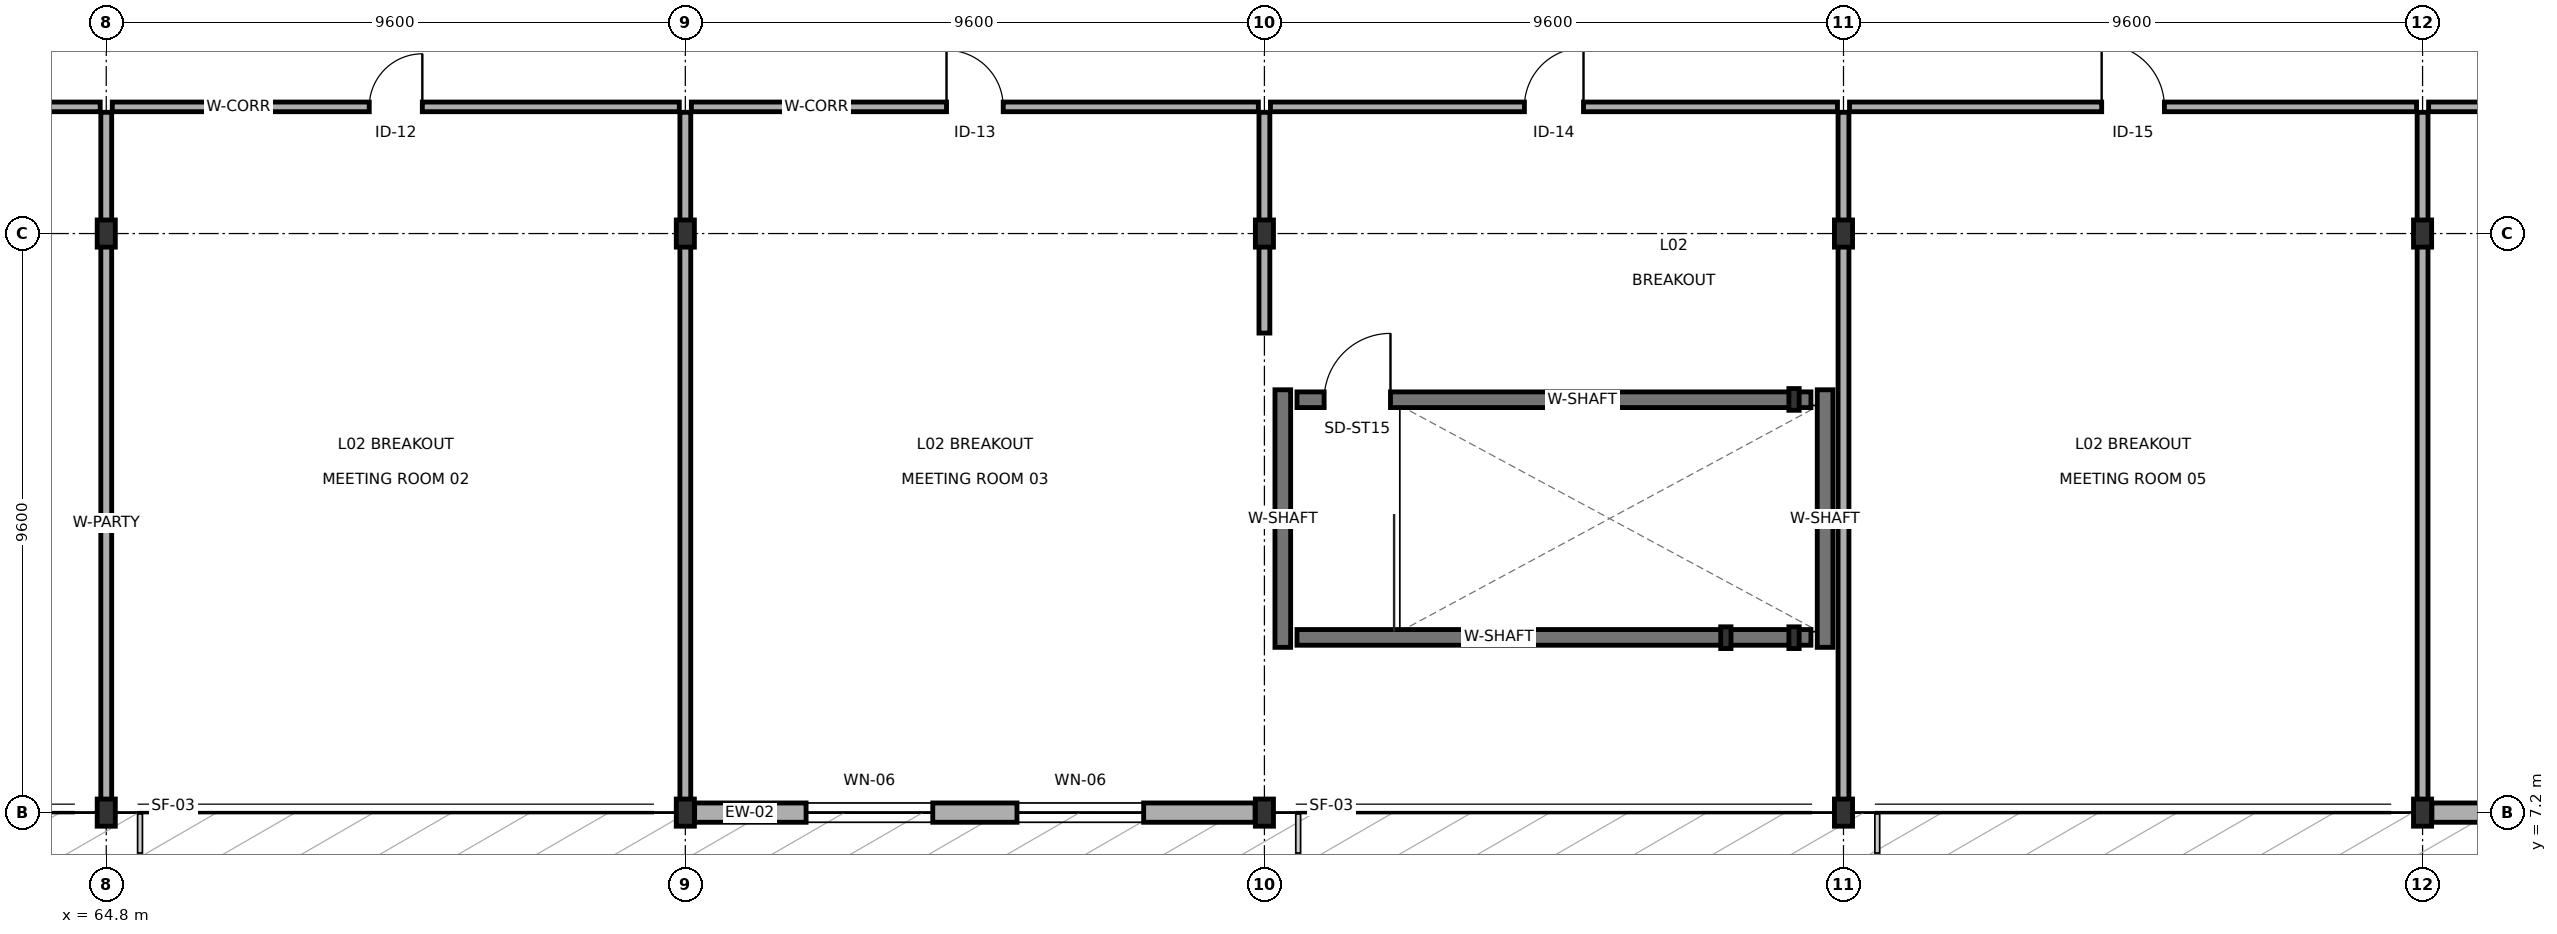
"""IFC4 building model, lengths in metres.
Left out: names, types, materials, properties, quantities, classifications, styles, units other than length and angle.
Written with IfcOpenShell. Run it as: python <this file> out.ifc"""

import sys

from ifc_helpers import new_model, si_unit, direction, frame, frame_2d, origin, origin_2d, place, context, subcontext, project, spatial, rectangle, i_section, extrude, element, fill, save


model = new_model("IFC4")
c1 = context("Model", 3, precision=1e-05, world=origin(), true_north=direction((0.0, 1.0)))
c2 = subcontext(c1, "Body", "Model", "MODEL_VIEW")
j1 = project(units=[si_unit("LENGTHUNIT", "METRE"), si_unit("PLANEANGLEUNIT", "RADIAN")], contexts=[c1])
p1 = place(None, origin())
s1 = spatial("IfcSite", under=j1, at=p1, CompositionType="ELEMENT")
p2 = place(p1, origin())
s2 = spatial("IfcBuilding", under=s1, at=p2, CompositionType="ELEMENT")
p3 = place(p2, frame((0.0, 0.0, 5.4)))
s3 = spatial("IfcBuildingStorey", under=s2, at=p3, CompositionType="ELEMENT", Elevation=5.4)
for number, where, z_axis, x_axis in (
    (1, (64.8, 7.2, 0.0), (0.0, 0.0, 1.0), (1.0, 0.0, 0.0)),
    (2, (64.8, 16.8, 0.0), (0.0, 0.0, 1.0), (1.0, 0.0, 0.0)),
    (3, (74.4, 7.2, 0.0), (0.0, 0.0, 1.0), (1.0, 0.0, 0.0)),
    (4, (74.4, 16.8, 0.0), (0.0, 0.0, 1.0), (1.0, 0.0, 0.0)),
    (5, (84.0, 7.2, 0.0), (0.0, 0.0, 1.0), (1.0, 0.0, 0.0)),
    (6, (84.0, 16.8, 0.0), (0.0, 0.0, 1.0), (1.0, 0.0, 0.0)),
    (7, (93.6, 7.2, 0.0), (0.0, 0.0, 1.0), (1.0, 0.0, 0.0)),
    (8, (93.6, 16.8, 0.0), (0.0, 0.0, 1.0), (1.0, 0.0, 0.0)),
    (9, (103.2, 7.2, 0.0), (0.0, 0.0, 1.0), (1.0, 0.0, 0.0)),
    (10, (103.2, 16.8, 0.0), (0.0, 0.0, 1.0), (1.0, 0.0, 0.0)),
):
    element("IfcColumn", number, at=place(p3, frame(where, z_axis=z_axis, x_axis=x_axis)), inside=s3, PredefinedType="COLUMN", context=c2, shape_type="SweptSolid", body=[
        extrude(i_section(OverallWidth=0.3, OverallDepth=0.45, WebThickness=0.014, FlangeThickness=0.026, FilletRadius=0.027, at=origin_2d()), origin(), (0.0, 0.0, 1.0), 4.5),
    ])
for number, where, z_axis, x_axis in (
    (11, (91.65, 10.1, 0.0), (0.0, 0.0, 1.0), (1.0, 0.0, 0.0)),
    (12, (92.78, 10.1, 0.0), (0.0, 0.0, 1.0), (1.0, 0.0, 0.0)),
    (13, (92.78, 14.05, 0.0), (0.0, 0.0, 1.0), (1.0, 0.0, 0.0)),
):
    element("IfcColumn", number, at=place(p3, frame(where, z_axis=z_axis, x_axis=x_axis)), inside=s3, PredefinedType="PILASTER", context=c2, shape_type="SweptSolid", body=[
        extrude(i_section(OverallWidth=0.17, OverallDepth=0.36, WebThickness=0.008, FlangeThickness=0.013, FilletRadius=0.018, at=origin_2d()), origin(), (0.0, 0.0, 1.0), 4.5),
    ])
p4 = place(p3, frame((74.554, 7.2, 0.0), z_axis=(0.0, 0.0, 1.0), x_axis=(1.0, 0.0, 0.0)))
e14 = element("IfcWall", 14, at=p4, inside=s3, PredefinedType="SOLIDWALL", context=c2, shape_type="SweptSolid", body=[
    extrude(rectangle(XDim=9.292, YDim=0.32, at=frame_2d((4.646, 0.0))), origin(), (0.0, 0.0, 1.0), 3.685),
])
p5 = place(p4, frame((1.848, 0.0, 0.75)))
e15 = element("IfcOpeningElement", 15, at=p5, cuts=e14, PredefinedType="OPENING", context=c2, shape_type="SweptSolid", body=[
    extrude(rectangle(XDim=2.1, YDim=1.4, at=frame_2d((1.05, 0.7))), frame((0.0, 0.17, 0.0), z_axis=(0.0, -1.0, 0.0), x_axis=(1.0, 0.0, 0.0)), (0.0, 0.0, 1.0), 0.34),
])
p6 = place(p4, frame((5.344, 0.0, 0.75)))
e16 = element("IfcOpeningElement", 16, at=p6, cuts=e14, PredefinedType="OPENING", context=c2, shape_type="SweptSolid", body=[
    extrude(rectangle(XDim=2.1, YDim=1.4, at=frame_2d((1.05, 0.7))), frame((0.0, 0.17, 0.0), z_axis=(0.0, -1.0, 0.0), x_axis=(1.0, 0.0, 0.0)), (0.0, 0.0, 1.0), 0.34),
])
p7 = place(p3, frame((103.354, 7.2, 0.0), z_axis=(0.0, 0.0, 1.0), x_axis=(1.0, 0.0, 0.0)))
e17 = element("IfcWall", 17, at=p7, inside=s3, PredefinedType="SOLIDWALL", context=c2, shape_type="SweptSolid", body=[
    extrude(rectangle(XDim=4.492, YDim=0.32, at=frame_2d((2.246, 0.0))), origin(), (0.0, 0.0, 1.0), 3.675),
])
for number, where, z_axis, x_axis in (
    (18, (84.305, 9.94, 0.0), (0.0, 0.0, 1.0), (0.0, 1.0, 0.0)),
    (19, (93.295, 9.94, 0.0), (0.0, 0.0, 1.0), (0.0, 1.0, 0.0)),
):
    element("IfcWall", number, at=place(p3, frame(where, z_axis=z_axis, x_axis=x_axis)), inside=s3, PredefinedType="SHEAR", context=c2, shape_type="SweptSolid", body=[
        extrude(rectangle(XDim=4.27, YDim=0.26, at=frame_2d((2.135, 0.0))), origin(), (0.0, 0.0, 1.0), 4.24),
    ])
p8 = place(p3, frame((84.54, 10.105, 0.0), z_axis=(0.0, 0.0, 1.0), x_axis=(1.0, 0.0, 0.0)))
e20 = element("IfcWall", 20, at=p8, inside=s3, PredefinedType="SHEAR", context=c2, shape_type="SweptSolid", body=[
    extrude(rectangle(XDim=8.52, YDim=0.26, at=frame_2d((4.26, 0.0))), origin(), (0.0, 0.0, 1.0), 4.24),
])
p9 = place(p3, frame((84.54, 14.045, 0.0), z_axis=(0.0, 0.0, 1.0), x_axis=(1.0, 0.0, 0.0)))
e21 = element("IfcWall", 21, at=p9, inside=s3, PredefinedType="SHEAR", context=c2, shape_type="SweptSolid", body=[
    extrude(rectangle(XDim=8.52, YDim=0.26, at=frame_2d((4.26, 0.0))), origin(), (0.0, 0.0, 1.0), 4.24),
])
p10 = place(p9, frame((0.45, 0.0, 0.0)))
e22 = element("IfcOpeningElement", 22, at=p10, cuts=e21, PredefinedType="OPENING", context=c2, shape_type="SweptSolid", body=[
    extrude(rectangle(XDim=1.1, YDim=2.2, at=frame_2d((0.55, 1.1))), frame((0.0, 0.14, 0.0), z_axis=(0.0, -1.0, 0.0), x_axis=(1.0, 0.0, 0.0)), (0.0, 0.0, 1.0), 0.28),
])
p11 = place(p3, frame((55.3, 18.9, 0.0), z_axis=(0.0, 0.0, 1.0), x_axis=(1.0, 0.0, 0.0)))
e23 = element("IfcWall", 23, at=p11, inside=s3, PredefinedType="PARTITIONING", context=c2, shape_type="SweptSolid", body=[
    extrude(rectangle(XDim=9.4, YDim=0.16, at=frame_2d((4.7, 0.0))), origin(), (0.0, 0.0, 1.0), 3.675),
])
p12 = place(p11, frame((4.29, 0.0, 0.0)))
e24 = element("IfcOpeningElement", 24, at=p12, cuts=e23, PredefinedType="OPENING", context=c2, shape_type="SweptSolid", body=[
    extrude(rectangle(XDim=0.82, YDim=2.08, at=frame_2d((0.41, 1.04))), frame((0.0, 0.09, 0.0), z_axis=(0.0, -1.0, 0.0), x_axis=(1.0, 0.0, 0.0)), (0.0, 0.0, 1.0), 0.18),
])
p13 = place(p3, frame((64.9, 18.9, 0.0), z_axis=(0.0, 0.0, 1.0), x_axis=(1.0, 0.0, 0.0)))
e25 = element("IfcWall", 25, at=p13, inside=s3, PredefinedType="PARTITIONING", context=c2, shape_type="SweptSolid", body=[
    extrude(rectangle(XDim=9.4, YDim=0.16, at=frame_2d((4.7, 0.0))), origin(), (0.0, 0.0, 1.0), 3.675),
])
p14 = place(p13, frame((4.26, 0.0, 0.0)))
e26 = element("IfcOpeningElement", 26, at=p14, cuts=e25, PredefinedType="OPENING", context=c2, shape_type="SweptSolid", body=[
    extrude(rectangle(XDim=0.88, YDim=2.12, at=frame_2d((0.44, 1.06))), frame((0.0, 0.09, 0.0), z_axis=(0.0, -1.0, 0.0), x_axis=(1.0, 0.0, 0.0)), (0.0, 0.0, 1.0), 0.18),
])
p15 = place(p3, frame((64.8, 7.4, 0.0), z_axis=(0.0, 0.0, 1.0), x_axis=(0.0, 1.0, 0.0)))
e27 = element("IfcWall", 27, at=p15, inside=s3, PredefinedType="PARTITIONING", context=c2, shape_type="SweptSolid", body=[
    extrude(rectangle(XDim=11.41, YDim=0.18, at=frame_2d((5.705, 0.0))), origin(), (0.0, 0.0, 1.0), 3.685),
])
p16 = place(p3, frame((74.5, 18.9, 0.0), z_axis=(0.0, 0.0, 1.0), x_axis=(1.0, 0.0, 0.0)))
e28 = element("IfcWall", 28, at=p16, inside=s3, PredefinedType="PARTITIONING", context=c2, shape_type="SweptSolid", body=[
    extrude(rectangle(XDim=9.4, YDim=0.16, at=frame_2d((4.7, 0.0))), origin(), (0.0, 0.0, 1.0), 3.675),
])
p17 = place(p16, frame((4.23, 0.0, 0.0)))
e29 = element("IfcOpeningElement", 29, at=p17, cuts=e28, PredefinedType="OPENING", context=c2, shape_type="SweptSolid", body=[
    extrude(rectangle(XDim=0.94, YDim=2.14, at=frame_2d((0.47, 1.07))), frame((0.0, 0.09, 0.0), z_axis=(0.0, -1.0, 0.0), x_axis=(1.0, 0.0, 0.0)), (0.0, 0.0, 1.0), 0.18),
])
p18 = place(p3, frame((74.4, 7.4, 0.0), z_axis=(0.0, 0.0, 1.0), x_axis=(0.0, 1.0, 0.0)))
e30 = element("IfcWall", 30, at=p18, inside=s3, PredefinedType="PARTITIONING", context=c2, shape_type="SweptSolid", body=[
    extrude(rectangle(XDim=11.41, YDim=0.18, at=frame_2d((5.705, 0.0))), origin(), (0.0, 0.0, 1.0), 3.685),
])
p19 = place(p3, frame((84.1, 18.9, 0.0), z_axis=(0.0, 0.0, 1.0), x_axis=(1.0, 0.0, 0.0)))
e31 = element("IfcWall", 31, at=p19, inside=s3, PredefinedType="PARTITIONING", context=c2, shape_type="SweptSolid", body=[
    extrude(rectangle(XDim=9.4, YDim=0.16, at=frame_2d((4.7, 0.0))), origin(), (0.0, 0.0, 1.0), 3.675),
])
p20 = place(p19, frame((4.21, 0.0, 0.0)))
e32 = element("IfcOpeningElement", 32, at=p20, cuts=e31, PredefinedType="OPENING", context=c2, shape_type="SweptSolid", body=[
    extrude(rectangle(XDim=0.98, YDim=2.16, at=frame_2d((0.49, 1.08))), frame((0.0, 0.09, 0.0), z_axis=(0.0, -1.0, 0.0), x_axis=(1.0, 0.0, 0.0)), (0.0, 0.0, 1.0), 0.18),
])
p21 = place(p3, frame((84.0, 15.15, 0.0), z_axis=(0.0, 0.0, 1.0), x_axis=(0.0, 1.0, 0.0)))
e33 = element("IfcWall", 33, at=p21, inside=s3, PredefinedType="PARTITIONING", context=c2, shape_type="SweptSolid", body=[
    extrude(rectangle(XDim=3.66, YDim=0.18, at=frame_2d((1.83, 0.0))), origin(), (0.0, 0.0, 1.0), 3.685),
])
p22 = place(p3, frame((93.7, 18.9, 0.0), z_axis=(0.0, 0.0, 1.0), x_axis=(1.0, 0.0, 0.0)))
e34 = element("IfcWall", 34, at=p22, inside=s3, PredefinedType="PARTITIONING", context=c2, shape_type="SweptSolid", body=[
    extrude(rectangle(XDim=9.4, YDim=0.16, at=frame_2d((4.7, 0.0))), origin(), (0.0, 0.0, 1.0), 3.675),
])
p23 = place(p22, frame((4.18, 0.0, 0.0)))
e35 = element("IfcOpeningElement", 35, at=p23, cuts=e34, PredefinedType="OPENING", context=c2, shape_type="SweptSolid", body=[
    extrude(rectangle(XDim=1.04, YDim=2.18, at=frame_2d((0.52, 1.09))), frame((0.0, 0.09, 0.0), z_axis=(0.0, -1.0, 0.0), x_axis=(1.0, 0.0, 0.0)), (0.0, 0.0, 1.0), 0.18),
])
p24 = place(p3, frame((93.6, 7.4, 0.0), z_axis=(0.0, 0.0, 1.0), x_axis=(0.0, 1.0, 0.0)))
e36 = element("IfcWall", 36, at=p24, inside=s3, PredefinedType="PARTITIONING", context=c2, shape_type="SweptSolid", body=[
    extrude(rectangle(XDim=11.41, YDim=0.18, at=frame_2d((5.705, 0.0))), origin(), (0.0, 0.0, 1.0), 3.685),
])
p25 = place(p3, frame((103.3, 18.9, 0.0), z_axis=(0.0, 0.0, 1.0), x_axis=(1.0, 0.0, 0.0)))
e37 = element("IfcWall", 37, at=p25, inside=s3, PredefinedType="PARTITIONING", context=c2, shape_type="SweptSolid", body=[
    extrude(rectangle(XDim=14.2, YDim=0.16, at=frame_2d((7.1, 0.0))), origin(), (0.0, 0.0, 1.0), 3.675),
])
p26 = place(p25, frame((6.56, 0.0, 0.0)))
e38 = element("IfcOpeningElement", 38, at=p26, cuts=e37, PredefinedType="OPENING", context=c2, shape_type="SweptSolid", body=[
    extrude(rectangle(XDim=1.08, YDim=2.18, at=frame_2d((0.54, 1.09))), frame((0.0, 0.09, 0.0), z_axis=(0.0, -1.0, 0.0), x_axis=(1.0, 0.0, 0.0)), (0.0, 0.0, 1.0), 0.18),
])
p27 = place(p3, frame((103.2, 7.4, 0.0), z_axis=(0.0, 0.0, 1.0), x_axis=(0.0, 1.0, 0.0)))
e39 = element("IfcWall", 39, at=p27, inside=s3, PredefinedType="PARTITIONING", context=c2, shape_type="SweptSolid", body=[
    extrude(rectangle(XDim=11.41, YDim=0.18, at=frame_2d((5.705, 0.0))), origin(), (0.0, 0.0, 1.0), 3.685),
])
p28 = place(p5, origin())
e40 = element("IfcWindow", 40, at=p28, inside=s3, PartitioningType="SINGLE_PANEL", PredefinedType="WINDOW", context=c2, shape_type="SweptSolid", body=[
    extrude(rectangle(XDim=2.1, YDim=1.4, at=frame_2d((1.05, 0.7))), frame((0.0, 0.03, 0.0), z_axis=(0.0, -1.0, 0.0), x_axis=(1.0, 0.0, 0.0)), (0.0, 0.0, 1.0), 0.06),
])
fill(e15, e40)
p29 = place(p6, origin())
e41 = element("IfcWindow", 41, at=p29, inside=s3, PartitioningType="SINGLE_PANEL", PredefinedType="WINDOW", context=c2, shape_type="SweptSolid", body=[
    extrude(rectangle(XDim=2.1, YDim=1.4, at=frame_2d((1.05, 0.7))), frame((0.0, 0.03, 0.0), z_axis=(0.0, -1.0, 0.0), x_axis=(1.0, 0.0, 0.0)), (0.0, 0.0, 1.0), 0.06),
])
fill(e16, e41)
p30 = place(p10, origin())
e42 = element("IfcDoor", 42, at=p30, inside=s3, OperationType="SINGLE_SWING_RIGHT", PredefinedType="DOOR", context=c2, shape_type="SweptSolid", body=[
    extrude(rectangle(XDim=1.1, YDim=2.2, at=frame_2d((0.55, 1.1))), frame((0.0, 0.025, 0.0), z_axis=(0.0, -1.0, 0.0), x_axis=(1.0, 0.0, 0.0)), (0.0, 0.0, 1.0), 0.05),
])
fill(e22, e42)
p31 = place(p14, origin())
e43 = element("IfcDoor", 43, at=p31, inside=s3, OperationType="SINGLE_SWING_RIGHT", PredefinedType="DOOR", context=c2, shape_type="SweptSolid", body=[
    extrude(rectangle(XDim=0.88, YDim=2.12, at=frame_2d((0.44, 1.06))), frame((0.0, 0.025, 0.0), z_axis=(0.0, -1.0, 0.0), x_axis=(1.0, 0.0, 0.0)), (0.0, 0.0, 1.0), 0.05),
])
fill(e26, e43)
p32 = place(p17, origin())
e44 = element("IfcDoor", 44, at=p32, inside=s3, OperationType="SINGLE_SWING_LEFT", PredefinedType="DOOR", context=c2, shape_type="SweptSolid", body=[
    extrude(rectangle(XDim=0.94, YDim=2.14, at=frame_2d((0.47, 1.07))), frame((0.0, 0.025, 0.0), z_axis=(0.0, -1.0, 0.0), x_axis=(1.0, 0.0, 0.0)), (0.0, 0.0, 1.0), 0.05),
])
fill(e29, e44)
p33 = place(p20, origin())
e45 = element("IfcDoor", 45, at=p33, inside=s3, OperationType="SINGLE_SWING_RIGHT", PredefinedType="DOOR", context=c2, shape_type="SweptSolid", body=[
    extrude(rectangle(XDim=0.98, YDim=2.16, at=frame_2d((0.49, 1.08))), frame((0.0, 0.025, 0.0), z_axis=(0.0, -1.0, 0.0), x_axis=(1.0, 0.0, 0.0)), (0.0, 0.0, 1.0), 0.05),
])
fill(e32, e45)
p34 = place(p23, origin())
e46 = element("IfcDoor", 46, at=p34, inside=s3, OperationType="SINGLE_SWING_LEFT", PredefinedType="DOOR", context=c2, shape_type="SweptSolid", body=[
    extrude(rectangle(XDim=1.04, YDim=2.18, at=frame_2d((0.52, 1.09))), frame((0.0, 0.025, 0.0), z_axis=(0.0, -1.0, 0.0), x_axis=(1.0, 0.0, 0.0)), (0.0, 0.0, 1.0), 0.05),
])
fill(e35, e46)
save(model, sys.argv[1])
